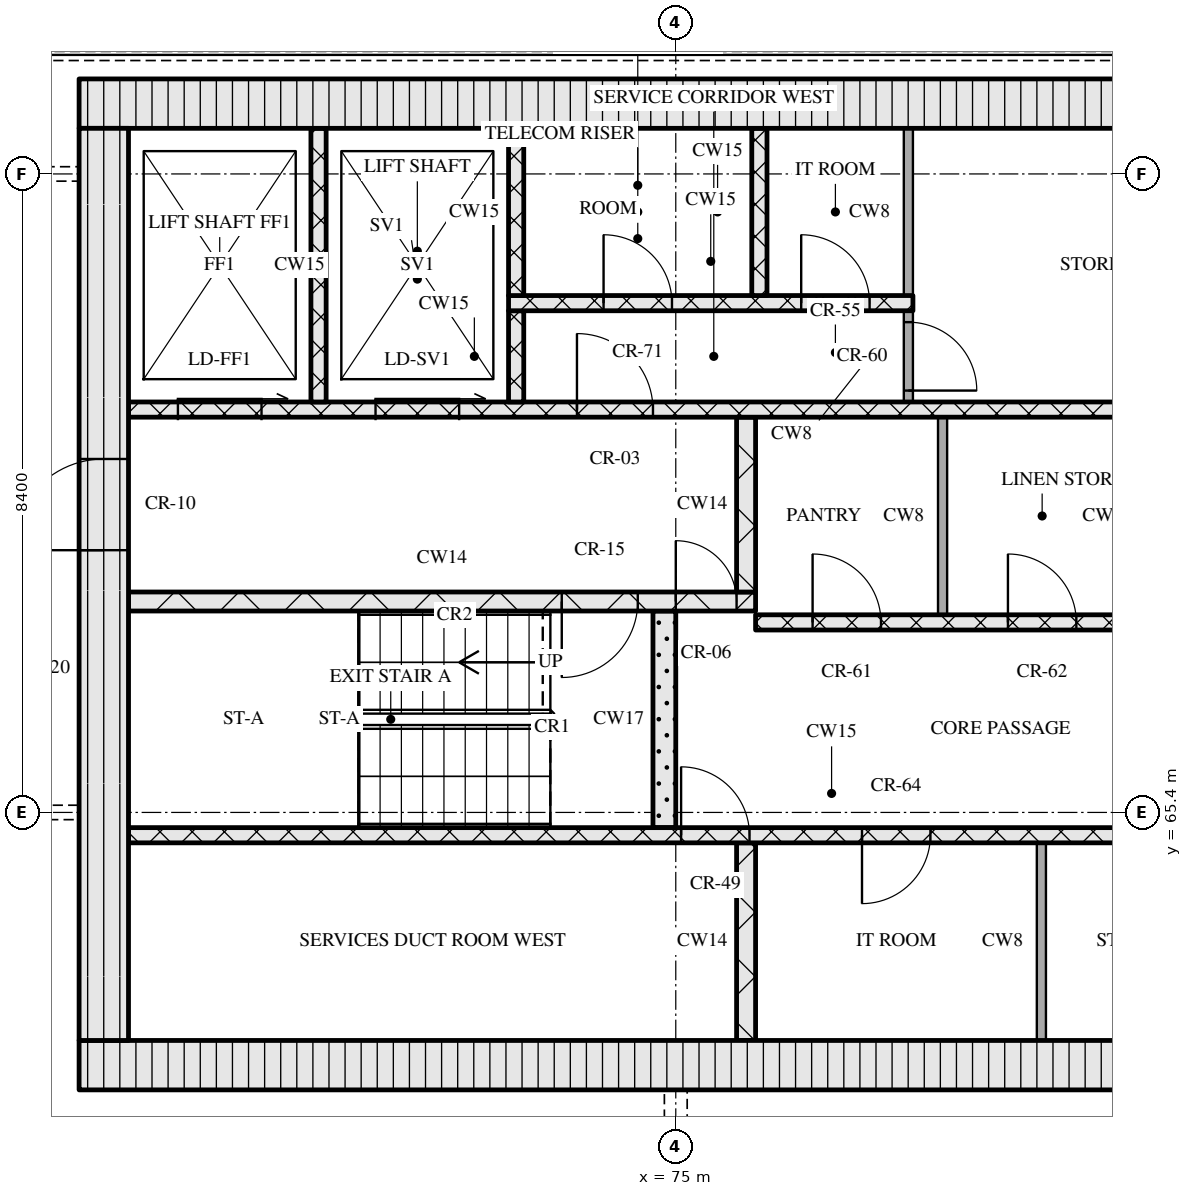
"""IFC4 building model, lengths in metres.
Left out: names, types, materials, properties, quantities, classifications, styles, units other than length and angle.
Written with IfcOpenShell. Run it as: python <this file> out.ifc"""

import sys

from ifc_helpers import new_model, si_unit, direction, frame, frame_2d, origin, place, context, subcontext, project, spatial, rectangle, extrude, element, fill, save


model = new_model("IFC4")
c1 = context("Model", 3, precision=1e-05, world=origin(), true_north=direction((0.0, 1.0)))
c2 = subcontext(c1, "Body", "Model", "MODEL_VIEW")
j1 = project(units=[si_unit("LENGTHUNIT", "METRE"), si_unit("PLANEANGLEUNIT", "RADIAN")], contexts=[c1])
p1 = place(None, origin())
s1 = spatial("IfcSite", under=j1, at=p1, CompositionType="ELEMENT")
p2 = place(p1, origin())
s2 = spatial("IfcBuilding", under=s1, at=p2, CompositionType="ELEMENT")
p3 = place(p2, frame((0.0, 0.0, 237.9)))
s3 = spatial("IfcBuildingStorey", under=s2, at=p3, CompositionType="ELEMENT", Elevation=237.9)
p4 = place(p3, frame((67.15, 62.075, 0.0), z_axis=(0.0, 0.0, 1.0), x_axis=(1.0, 0.0, 0.0)))
e1 = element("IfcWall", 1, at=p4, inside=s3, PredefinedType="SOLIDWALL", context=c2, shape_type="SweptSolid", body=[
    extrude(rectangle(XDim=40.9, YDim=0.65, at=frame_2d((20.45, 0.0))), origin(), (0.0, 0.0, 1.0), 3.32),
])
p5 = place(p4, frame((20.8, 0.0, 0.0)))
e2 = element("IfcOpeningElement", 2, at=p5, cuts=e1, PredefinedType="OPENING", context=c2, shape_type="SweptSolid", body=[
    extrude(rectangle(XDim=1.8, YDim=2.1, at=frame_2d((0.9, 1.05))), frame((0.0, 0.335, 0.0), z_axis=(0.0, -1.0, 0.0), x_axis=(1.0, 0.0, 0.0)), (0.0, 0.0, 1.0), 0.67),
])
p6 = place(p3, frame((67.15, 74.725, 0.0), z_axis=(0.0, 0.0, 1.0), x_axis=(1.0, 0.0, 0.0)))
e3 = element("IfcWall", 3, at=p6, inside=s3, PredefinedType="SOLIDWALL", context=c2, shape_type="SweptSolid", body=[
    extrude(rectangle(XDim=40.9, YDim=0.65, at=frame_2d((20.45, 0.0))), origin(), (0.0, 0.0, 1.0), 3.32),
])
p7 = place(p3, frame((67.475, 62.4, 0.0), z_axis=(0.0, 0.0, 1.0), x_axis=(0.0, 1.0, 0.0)))
e4 = element("IfcWall", 4, at=p7, inside=s3, PredefinedType="SOLIDWALL", context=c2, shape_type="SweptSolid", body=[
    extrude(rectangle(XDim=12.0, YDim=0.65, at=frame_2d((6.0, 0.0))), origin(), (0.0, 0.0, 1.0), 3.32),
])
p8 = place(p7, frame((6.45, 0.0, 0.0)))
e5 = element("IfcOpeningElement", 5, at=p8, cuts=e4, PredefinedType="OPENING", context=c2, shape_type="SweptSolid", body=[
    extrude(rectangle(XDim=1.2, YDim=2.1, at=frame_2d((0.6, 1.05))), frame((0.0, 0.335, 0.0), z_axis=(0.0, -1.0, 0.0), x_axis=(1.0, 0.0, 0.0)), (0.0, 0.0, 1.0), 0.67),
])
p9 = place(p3, frame((75.925, 62.4, 0.0), z_axis=(0.0, 0.0, 1.0), x_axis=(0.0, 1.0, 0.0)))
e6 = element("IfcWall", 6, at=p9, inside=s3, PredefinedType="SOLIDWALL", context=c2, shape_type="SweptSolid", body=[
    extrude(rectangle(XDim=2.6, YDim=0.25, at=frame_2d((1.3, 0.0))), origin(), (0.0, 0.0, 1.0), 3.32),
])
p10 = place(p3, frame((79.81, 62.4, 0.0), z_axis=(0.0, 0.0, 1.0), x_axis=(0.0, 1.0, 0.0)))
e7 = element("IfcWall", 7, at=p10, inside=s3, PredefinedType="PARTITIONING", context=c2, shape_type="SweptSolid", body=[
    extrude(rectangle(XDim=2.6, YDim=0.12, at=frame_2d((1.3, 0.0))), origin(), (0.0, 0.0, 1.0), 3.32),
])
p11 = place(p3, frame((67.8, 65.1, 0.0), z_axis=(0.0, 0.0, 1.0), x_axis=(1.0, 0.0, 0.0)))
e8 = element("IfcWall", 8, at=p11, inside=s3, PredefinedType="SOLIDWALL", context=c2, shape_type="SweptSolid", body=[
    extrude(rectangle(XDim=18.5, YDim=0.2, at=frame_2d((9.25, 0.0))), origin(), (0.0, 0.0, 1.0), 3.32),
])
p12 = place(p11, frame((7.27, 0.0, 0.0)))
e9 = element("IfcOpeningElement", 9, at=p12, cuts=e8, PredefinedType="OPENING", context=c2, shape_type="SweptSolid", body=[
    extrude(rectangle(XDim=0.9, YDim=2.1, at=frame_2d((0.45, 1.05))), frame((0.0, 0.11, 0.0), z_axis=(0.0, -1.0, 0.0), x_axis=(1.0, 0.0, 0.0)), (0.0, 0.0, 1.0), 0.22),
])
p13 = place(p11, frame((9.65, 0.0, 0.0)))
e10 = element("IfcOpeningElement", 10, at=p13, cuts=e8, PredefinedType="OPENING", context=c2, shape_type="SweptSolid", body=[
    extrude(rectangle(XDim=0.9, YDim=2.1, at=frame_2d((0.45, 1.05))), frame((0.0, 0.11, 0.0), z_axis=(0.0, -1.0, 0.0), x_axis=(1.0, 0.0, 0.0)), (0.0, 0.0, 1.0), 0.22),
])
p14 = place(p11, frame((13.36, 0.0, 0.0)))
e11 = element("IfcOpeningElement", 11, at=p14, cuts=e8, PredefinedType="OPENING", context=c2, shape_type="SweptSolid", body=[
    extrude(rectangle(XDim=0.9, YDim=2.1, at=frame_2d((0.45, 1.05))), frame((0.0, 0.11, 0.0), z_axis=(0.0, -1.0, 0.0), x_axis=(1.0, 0.0, 0.0)), (0.0, 0.0, 1.0), 0.22),
])
p15 = place(p11, frame((16.7, 0.0, 0.0)))
e12 = element("IfcOpeningElement", 12, at=p15, cuts=e8, PredefinedType="OPENING", context=c2, shape_type="SweptSolid", body=[
    extrude(rectangle(XDim=0.9, YDim=2.1, at=frame_2d((0.45, 1.05))), frame((0.0, 0.11, 0.0), z_axis=(0.0, -1.0, 0.0), x_axis=(1.0, 0.0, 0.0)), (0.0, 0.0, 1.0), 0.22),
])
p16 = place(p3, frame((74.85, 65.2, 0.0), z_axis=(0.0, 0.0, 1.0), x_axis=(0.0, 1.0, 0.0)))
e13 = element("IfcWall", 13, at=p16, inside=s3, PredefinedType="SOLIDWALL", context=c2, shape_type="SweptSolid", body=[
    extrude(rectangle(XDim=2.85, YDim=0.3, at=frame_2d((1.425, 0.0))), origin(), (0.0, 0.0, 1.0), 3.32),
])
p17 = place(p3, frame((76.05, 67.9, 0.0), z_axis=(0.0, 0.0, 1.0), x_axis=(1.0, 0.0, 0.0)))
e14 = element("IfcWall", 14, at=p17, inside=s3, PredefinedType="SOLIDWALL", context=c2, shape_type="SweptSolid", body=[
    extrude(rectangle(XDim=23.1, YDim=0.2, at=frame_2d((11.55, 0.0))), origin(), (0.0, 0.0, 1.0), 3.32),
])
p18 = place(p17, frame((0.75, 0.0, 0.0)))
e15 = element("IfcOpeningElement", 15, at=p18, cuts=e14, PredefinedType="OPENING", context=c2, shape_type="SweptSolid", body=[
    extrude(rectangle(XDim=0.9, YDim=2.1, at=frame_2d((0.45, 1.05))), frame((0.0, 0.11, 0.0), z_axis=(0.0, -1.0, 0.0), x_axis=(1.0, 0.0, 0.0)), (0.0, 0.0, 1.0), 0.22),
])
p19 = place(p17, frame((3.32, 0.0, 0.0)))
e16 = element("IfcOpeningElement", 16, at=p19, cuts=e14, PredefinedType="OPENING", context=c2, shape_type="SweptSolid", body=[
    extrude(rectangle(XDim=0.9, YDim=2.1, at=frame_2d((0.45, 1.05))), frame((0.0, 0.11, 0.0), z_axis=(0.0, -1.0, 0.0), x_axis=(1.0, 0.0, 0.0)), (0.0, 0.0, 1.0), 0.22),
])
p20 = place(p17, frame((5.77, 0.0, 0.0)))
e17 = element("IfcOpeningElement", 17, at=p20, cuts=e14, PredefinedType="OPENING", context=c2, shape_type="SweptSolid", body=[
    extrude(rectangle(XDim=0.9, YDim=2.1, at=frame_2d((0.45, 1.05))), frame((0.0, 0.11, 0.0), z_axis=(0.0, -1.0, 0.0), x_axis=(1.0, 0.0, 0.0)), (0.0, 0.0, 1.0), 0.22),
])
p21 = place(p17, frame((8.45, 0.0, 0.0)))
e18 = element("IfcOpeningElement", 18, at=p21, cuts=e14, PredefinedType="OPENING", context=c2, shape_type="SweptSolid", body=[
    extrude(rectangle(XDim=0.9, YDim=2.1, at=frame_2d((0.45, 1.05))), frame((0.0, 0.11, 0.0), z_axis=(0.0, -1.0, 0.0), x_axis=(1.0, 0.0, 0.0)), (0.0, 0.0, 1.0), 0.22),
])
p22 = place(p17, frame((10.91, 0.0, 0.0)))
e19 = element("IfcOpeningElement", 19, at=p22, cuts=e14, PredefinedType="OPENING", context=c2, shape_type="SweptSolid", body=[
    extrude(rectangle(XDim=0.9, YDim=2.1, at=frame_2d((0.45, 1.05))), frame((0.0, 0.11, 0.0), z_axis=(0.0, -1.0, 0.0), x_axis=(1.0, 0.0, 0.0)), (0.0, 0.0, 1.0), 0.22),
])
p23 = place(p17, frame((13.55, 0.0, 0.0)))
e20 = element("IfcOpeningElement", 20, at=p23, cuts=e14, PredefinedType="OPENING", context=c2, shape_type="SweptSolid", body=[
    extrude(rectangle(XDim=1.0, YDim=2.1, at=frame_2d((0.5, 1.05))), frame((0.0, 0.11, 0.0), z_axis=(0.0, -1.0, 0.0), x_axis=(1.0, 0.0, 0.0)), (0.0, 0.0, 1.0), 0.22),
])
p24 = place(p17, frame((16.2, 0.0, 0.0)))
e21 = element("IfcOpeningElement", 21, at=p24, cuts=e14, PredefinedType="OPENING", context=c2, shape_type="SweptSolid", body=[
    extrude(rectangle(XDim=1.1, YDim=2.1, at=frame_2d((0.55, 1.05))), frame((0.0, 0.11, 0.0), z_axis=(0.0, -1.0, 0.0), x_axis=(1.0, 0.0, 0.0)), (0.0, 0.0, 1.0), 0.22),
])
p25 = place(p17, frame((18.7, 0.0, 0.0)))
e22 = element("IfcOpeningElement", 22, at=p25, cuts=e14, PredefinedType="OPENING", context=c2, shape_type="SweptSolid", body=[
    extrude(rectangle(XDim=1.1, YDim=2.1, at=frame_2d((0.55, 1.05))), frame((0.0, 0.11, 0.0), z_axis=(0.0, -1.0, 0.0), x_axis=(1.0, 0.0, 0.0)), (0.0, 0.0, 1.0), 0.22),
])
p26 = place(p17, frame((21.2, 0.0, 0.0)))
e23 = element("IfcOpeningElement", 23, at=p26, cuts=e14, PredefinedType="OPENING", context=c2, shape_type="SweptSolid", body=[
    extrude(rectangle(XDim=1.1, YDim=2.1, at=frame_2d((0.55, 1.05))), frame((0.0, 0.11, 0.0), z_axis=(0.0, -1.0, 0.0), x_axis=(1.0, 0.0, 0.0)), (0.0, 0.0, 1.0), 0.22),
])
p27 = place(p3, frame((78.51, 68.0, 0.0), z_axis=(0.0, 0.0, 1.0), x_axis=(0.0, 1.0, 0.0)))
e24 = element("IfcWall", 24, at=p27, inside=s3, PredefinedType="PARTITIONING", context=c2, shape_type="SweptSolid", body=[
    extrude(rectangle(XDim=2.6, YDim=0.12, at=frame_2d((1.3, 0.0))), origin(), (0.0, 0.0, 1.0), 3.32),
])
p28 = place(p3, frame((67.8, 68.175, 0.0), z_axis=(0.0, 0.0, 1.0), x_axis=(1.0, 0.0, 0.0)))
e25 = element("IfcWall", 25, at=p28, inside=s3, PredefinedType="SOLIDWALL", context=c2, shape_type="SweptSolid", body=[
    extrude(rectangle(XDim=8.25, YDim=0.25, at=frame_2d((4.125, 0.0))), origin(), (0.0, 0.0, 1.0), 3.32),
])
p29 = place(p28, frame((5.7, 0.0, 0.0)))
e26 = element("IfcOpeningElement", 26, at=p29, cuts=e25, PredefinedType="OPENING", context=c2, shape_type="SweptSolid", body=[
    extrude(rectangle(XDim=1.0, YDim=2.1, at=frame_2d((0.5, 1.05))), frame((0.0, 0.135, 0.0), z_axis=(0.0, -1.0, 0.0), x_axis=(1.0, 0.0, 0.0)), (0.0, 0.0, 1.0), 0.27),
])
p30 = place(p28, frame((7.2, 0.0, 0.0)))
e27 = element("IfcOpeningElement", 27, at=p30, cuts=e25, PredefinedType="OPENING", context=c2, shape_type="SweptSolid", body=[
    extrude(rectangle(XDim=0.8, YDim=2.1, at=frame_2d((0.4, 1.05))), frame((0.0, 0.135, 0.0), z_axis=(0.0, -1.0, 0.0), x_axis=(1.0, 0.0, 0.0)), (0.0, 0.0, 1.0), 0.27),
])
p31 = place(p3, frame((75.925, 68.3, 0.0), z_axis=(0.0, 0.0, 1.0), x_axis=(0.0, 1.0, 0.0)))
e28 = element("IfcWall", 28, at=p31, inside=s3, PredefinedType="SOLIDWALL", context=c2, shape_type="SweptSolid", body=[
    extrude(rectangle(XDim=2.3, YDim=0.25, at=frame_2d((1.15, 0.0))), origin(), (0.0, 0.0, 1.0), 3.32),
])
p32 = place(p3, frame((67.8, 70.7, 0.0), z_axis=(0.0, 0.0, 1.0), x_axis=(1.0, 0.0, 0.0)))
e29 = element("IfcWall", 29, at=p32, inside=s3, PredefinedType="SOLIDWALL", context=c2, shape_type="SweptSolid", body=[
    extrude(rectangle(XDim=39.6, YDim=0.2, at=frame_2d((19.8, 0.0))), origin(), (0.0, 0.0, 1.0), 3.32),
])
p33 = place(p32, frame((0.65, 0.0, 0.0)))
e30 = element("IfcOpeningElement", 30, at=p33, cuts=e29, PredefinedType="OPENING", context=c2, shape_type="SweptSolid", body=[
    extrude(rectangle(XDim=1.1, YDim=2.1, at=frame_2d((0.55, 1.05))), frame((0.0, 0.11, 0.0), z_axis=(0.0, -1.0, 0.0), x_axis=(1.0, 0.0, 0.0)), (0.0, 0.0, 1.0), 0.22),
])
p34 = place(p32, frame((3.25, 0.0, 0.0)))
e31 = element("IfcOpeningElement", 31, at=p34, cuts=e29, PredefinedType="OPENING", context=c2, shape_type="SweptSolid", body=[
    extrude(rectangle(XDim=1.1, YDim=2.1, at=frame_2d((0.55, 1.05))), frame((0.0, 0.11, 0.0), z_axis=(0.0, -1.0, 0.0), x_axis=(1.0, 0.0, 0.0)), (0.0, 0.0, 1.0), 0.22),
])
p35 = place(p32, frame((5.9, 0.0, 0.0)))
e32 = element("IfcOpeningElement", 32, at=p35, cuts=e29, PredefinedType="OPENING", context=c2, shape_type="SweptSolid", body=[
    extrude(rectangle(XDim=1.0, YDim=2.1, at=frame_2d((0.5, 1.05))), frame((0.0, 0.11, 0.0), z_axis=(0.0, -1.0, 0.0), x_axis=(1.0, 0.0, 0.0)), (0.0, 0.0, 1.0), 0.22),
])
p36 = place(p32, frame((21.7, 0.0, 0.0)))
e33 = element("IfcOpeningElement", 33, at=p36, cuts=e29, PredefinedType="OPENING", context=c2, shape_type="SweptSolid", body=[
    extrude(rectangle(XDim=1.0, YDim=2.1, at=frame_2d((0.5, 1.05))), frame((0.0, 0.11, 0.0), z_axis=(0.0, -1.0, 0.0), x_axis=(1.0, 0.0, 0.0)), (0.0, 0.0, 1.0), 0.22),
])
p37 = place(p32, frame((32.7, 0.0, 0.0)))
e34 = element("IfcOpeningElement", 34, at=p37, cuts=e29, PredefinedType="OPENING", context=c2, shape_type="SweptSolid", body=[
    extrude(rectangle(XDim=1.0, YDim=2.1, at=frame_2d((0.5, 1.05))), frame((0.0, 0.11, 0.0), z_axis=(0.0, -1.0, 0.0), x_axis=(1.0, 0.0, 0.0)), (0.0, 0.0, 1.0), 0.22),
])
p38 = place(p32, frame((35.25, 0.0, 0.0)))
e35 = element("IfcOpeningElement", 35, at=p38, cuts=e29, PredefinedType="OPENING", context=c2, shape_type="SweptSolid", body=[
    extrude(rectangle(XDim=1.1, YDim=2.1, at=frame_2d((0.55, 1.05))), frame((0.0, 0.11, 0.0), z_axis=(0.0, -1.0, 0.0), x_axis=(1.0, 0.0, 0.0)), (0.0, 0.0, 1.0), 0.22),
])
p39 = place(p32, frame((37.85, 0.0, 0.0)))
e36 = element("IfcOpeningElement", 36, at=p39, cuts=e29, PredefinedType="OPENING", context=c2, shape_type="SweptSolid", body=[
    extrude(rectangle(XDim=1.1, YDim=2.1, at=frame_2d((0.55, 1.05))), frame((0.0, 0.11, 0.0), z_axis=(0.0, -1.0, 0.0), x_axis=(1.0, 0.0, 0.0)), (0.0, 0.0, 1.0), 0.22),
])
p40 = place(p3, frame((70.3, 70.8, 0.0), z_axis=(0.0, 0.0, 1.0), x_axis=(0.0, 1.0, 0.0)))
e37 = element("IfcWall", 37, at=p40, inside=s3, PredefinedType="SOLIDWALL", context=c2, shape_type="SweptSolid", body=[
    extrude(rectangle(XDim=3.6, YDim=0.2, at=frame_2d((1.8, 0.0))), origin(), (0.0, 0.0, 1.0), 3.32),
])
p41 = place(p3, frame((72.9, 70.8, 0.0), z_axis=(0.0, 0.0, 1.0), x_axis=(0.0, 1.0, 0.0)))
e38 = element("IfcWall", 38, at=p41, inside=s3, PredefinedType="SOLIDWALL", context=c2, shape_type="SweptSolid", body=[
    extrude(rectangle(XDim=1.2, YDim=0.2, at=frame_2d((0.6, 0.0))), origin(), (0.0, 0.0, 1.0), 3.32),
])
p42 = place(p3, frame((78.06, 70.8, 0.0), z_axis=(0.0, 0.0, 1.0), x_axis=(0.0, 1.0, 0.0)))
e39 = element("IfcWall", 39, at=p42, inside=s3, PredefinedType="PARTITIONING", context=c2, shape_type="SweptSolid", body=[
    extrude(rectangle(XDim=1.2, YDim=0.12, at=frame_2d((0.6, 0.0))), origin(), (0.0, 0.0, 1.0), 3.32),
])
p43 = place(p42, frame((0.15, 0.0, 0.0)))
e40 = element("IfcOpeningElement", 40, at=p43, cuts=e39, PredefinedType="OPENING", context=c2, shape_type="SweptSolid", body=[
    extrude(rectangle(XDim=0.9, YDim=2.1, at=frame_2d((0.45, 1.05))), frame((0.0, 0.07, 0.0), z_axis=(0.0, -1.0, 0.0), x_axis=(1.0, 0.0, 0.0)), (0.0, 0.0, 1.0), 0.14),
])
p44 = place(p3, frame((72.8, 72.1, 0.0), z_axis=(0.0, 0.0, 1.0), x_axis=(1.0, 0.0, 0.0)))
e41 = element("IfcWall", 41, at=p44, inside=s3, PredefinedType="SOLIDWALL", context=c2, shape_type="SweptSolid", body=[
    extrude(rectangle(XDim=5.32, YDim=0.2, at=frame_2d((2.66, 0.0))), origin(), (0.0, 0.0, 1.0), 3.32),
])
p45 = place(p44, frame((1.25, 0.0, 0.0)))
e42 = element("IfcOpeningElement", 42, at=p45, cuts=e41, PredefinedType="OPENING", context=c2, shape_type="SweptSolid", body=[
    extrude(rectangle(XDim=0.9, YDim=2.1, at=frame_2d((0.45, 1.05))), frame((0.0, 0.11, 0.0), z_axis=(0.0, -1.0, 0.0), x_axis=(1.0, 0.0, 0.0)), (0.0, 0.0, 1.0), 0.22),
])
p46 = place(p44, frame((3.85, 0.0, 0.0)))
e43 = element("IfcOpeningElement", 43, at=p46, cuts=e41, PredefinedType="OPENING", context=c2, shape_type="SweptSolid", body=[
    extrude(rectangle(XDim=0.9, YDim=2.1, at=frame_2d((0.45, 1.05))), frame((0.0, 0.11, 0.0), z_axis=(0.0, -1.0, 0.0), x_axis=(1.0, 0.0, 0.0)), (0.0, 0.0, 1.0), 0.22),
])
for number, where, z_axis, x_axis in (
    (44, (72.9, 72.2, 0.0), (0.0, 0.0, 1.0), (0.0, 1.0, 0.0)),
    (45, (76.1, 72.2, 0.0), (0.0, 0.0, 1.0), (0.0, 1.0, 0.0)),
):
    element("IfcWall", number, at=place(p3, frame(where, z_axis=z_axis, x_axis=x_axis)), inside=s3, PredefinedType="SOLIDWALL", context=c2, shape_type="SweptSolid", body=[
        extrude(rectangle(XDim=2.2, YDim=0.2, at=frame_2d((1.1, 0.0))), origin(), (0.0, 0.0, 1.0), 3.32),
    ])
p47 = place(p3, frame((78.06, 72.2, 0.0), z_axis=(0.0, 0.0, 1.0), x_axis=(0.0, 1.0, 0.0)))
e46 = element("IfcWall", 46, at=p47, inside=s3, PredefinedType="PARTITIONING", context=c2, shape_type="SweptSolid", body=[
    extrude(rectangle(XDim=2.2, YDim=0.12, at=frame_2d((1.1, 0.0))), origin(), (0.0, 0.0, 1.0), 3.32),
])
p48 = place(p12, origin())
e47 = element("IfcDoor", 47, at=p48, inside=s3, OperationType="SINGLE_SWING_LEFT", PredefinedType="DOOR", context=c2, shape_type="SweptSolid", body=[
    extrude(rectangle(XDim=0.9, YDim=2.1, at=frame_2d((0.45, 1.05))), frame((0.0, 0.025, 0.0), z_axis=(0.0, -1.0, 0.0), x_axis=(1.0, 0.0, 0.0)), (0.0, 0.0, 1.0), 0.05),
])
fill(e9, e47)
p49 = place(p13, origin())
e48 = element("IfcDoor", 48, at=p49, inside=s3, OperationType="SINGLE_SWING_RIGHT", PredefinedType="DOOR", context=c2, shape_type="SweptSolid", body=[
    extrude(rectangle(XDim=0.9, YDim=2.1, at=frame_2d((0.45, 1.05))), frame((0.0, 0.025, 0.0), z_axis=(0.0, -1.0, 0.0), x_axis=(1.0, 0.0, 0.0)), (0.0, 0.0, 1.0), 0.05),
])
fill(e10, e48)
p50 = place(p18, origin())
e49 = element("IfcDoor", 49, at=p50, inside=s3, OperationType="SINGLE_SWING_LEFT", PredefinedType="DOOR", context=c2, shape_type="SweptSolid", body=[
    extrude(rectangle(XDim=0.9, YDim=2.1, at=frame_2d((0.45, 1.05))), frame((0.0, 0.025, 0.0), z_axis=(0.0, -1.0, 0.0), x_axis=(1.0, 0.0, 0.0)), (0.0, 0.0, 1.0), 0.05),
])
fill(e15, e49)
p51 = place(p19, origin())
e50 = element("IfcDoor", 50, at=p51, inside=s3, OperationType="SINGLE_SWING_LEFT", PredefinedType="DOOR", context=c2, shape_type="SweptSolid", body=[
    extrude(rectangle(XDim=0.9, YDim=2.1, at=frame_2d((0.45, 1.05))), frame((0.0, 0.025, 0.0), z_axis=(0.0, -1.0, 0.0), x_axis=(1.0, 0.0, 0.0)), (0.0, 0.0, 1.0), 0.05),
])
fill(e16, e50)
p52 = place(p29, origin())
e51 = element("IfcDoor", 51, at=p52, inside=s3, OperationType="SINGLE_SWING_RIGHT", PredefinedType="DOOR", context=c2, shape_type="SweptSolid", body=[
    extrude(rectangle(XDim=1.0, YDim=2.1, at=frame_2d((0.5, 1.05))), frame((0.0, 0.025, 0.0), z_axis=(0.0, -1.0, 0.0), x_axis=(1.0, 0.0, 0.0)), (0.0, 0.0, 1.0), 0.05),
])
fill(e26, e51)
p53 = place(p30, origin())
e52 = element("IfcDoor", 52, at=p53, inside=s3, OperationType="SINGLE_SWING_LEFT", PredefinedType="DOOR", context=c2, shape_type="SweptSolid", body=[
    extrude(rectangle(XDim=0.8, YDim=2.1, at=frame_2d((0.4, 1.05))), frame((0.0, 0.025, 0.0), z_axis=(0.0, -1.0, 0.0), x_axis=(1.0, 0.0, 0.0)), (0.0, 0.0, 1.0), 0.05),
])
fill(e27, e52)
p54 = place(p8, origin())
e53 = element("IfcDoor", 53, at=p54, inside=s3, OperationType="SINGLE_SWING_LEFT", PredefinedType="DOOR", context=c2, shape_type="SweptSolid", body=[
    extrude(rectangle(XDim=1.2, YDim=2.1, at=frame_2d((0.6, 1.05))), frame((0.0, 0.025, 0.0), z_axis=(0.0, -1.0, 0.0), x_axis=(1.0, 0.0, 0.0)), (0.0, 0.0, 1.0), 0.05),
])
fill(e5, e53)
p55 = place(p33, origin())
e54 = element("IfcDoor", 54, at=p55, inside=s3, OperationType="SLIDING_TO_RIGHT", PredefinedType="DOOR", context=c2, shape_type="SweptSolid", body=[
    extrude(rectangle(XDim=1.1, YDim=2.1, at=frame_2d((0.55, 1.05))), frame((0.0, 0.025, 0.0), z_axis=(0.0, -1.0, 0.0), x_axis=(1.0, 0.0, 0.0)), (0.0, 0.0, 1.0), 0.05),
])
fill(e30, e54)
p56 = place(p34, origin())
e55 = element("IfcDoor", 55, at=p56, inside=s3, OperationType="SLIDING_TO_RIGHT", PredefinedType="DOOR", context=c2, shape_type="SweptSolid", body=[
    extrude(rectangle(XDim=1.1, YDim=2.1, at=frame_2d((0.55, 1.05))), frame((0.0, 0.025, 0.0), z_axis=(0.0, -1.0, 0.0), x_axis=(1.0, 0.0, 0.0)), (0.0, 0.0, 1.0), 0.05),
])
fill(e31, e55)
p57 = place(p35, origin())
e56 = element("IfcDoor", 56, at=p57, inside=s3, OperationType="SINGLE_SWING_LEFT", PredefinedType="DOOR", context=c2, shape_type="SweptSolid", body=[
    extrude(rectangle(XDim=1.0, YDim=2.1, at=frame_2d((0.5, 1.05))), frame((0.0, 0.025, 0.0), z_axis=(0.0, -1.0, 0.0), x_axis=(1.0, 0.0, 0.0)), (0.0, 0.0, 1.0), 0.05),
])
fill(e32, e56)
p58 = place(p43, origin())
e57 = element("IfcDoor", 57, at=p58, inside=s3, OperationType="SINGLE_SWING_RIGHT", PredefinedType="DOOR", context=c2, shape_type="SweptSolid", body=[
    extrude(rectangle(XDim=0.9, YDim=2.1, at=frame_2d((0.45, 1.05))), frame((0.0, 0.025, 0.0), z_axis=(0.0, -1.0, 0.0), x_axis=(1.0, 0.0, 0.0)), (0.0, 0.0, 1.0), 0.05),
])
fill(e40, e57)
p59 = place(p45, origin())
e58 = element("IfcDoor", 58, at=p59, inside=s3, OperationType="SINGLE_SWING_LEFT", PredefinedType="DOOR", context=c2, shape_type="SweptSolid", body=[
    extrude(rectangle(XDim=0.9, YDim=2.1, at=frame_2d((0.45, 1.05))), frame((0.0, 0.025, 0.0), z_axis=(0.0, -1.0, 0.0), x_axis=(1.0, 0.0, 0.0)), (0.0, 0.0, 1.0), 0.05),
])
fill(e42, e58)
p60 = place(p46, origin())
e59 = element("IfcDoor", 59, at=p60, inside=s3, OperationType="SINGLE_SWING_LEFT", PredefinedType="DOOR", context=c2, shape_type="SweptSolid", body=[
    extrude(rectangle(XDim=0.9, YDim=2.1, at=frame_2d((0.45, 1.05))), frame((0.0, 0.025, 0.0), z_axis=(0.0, -1.0, 0.0), x_axis=(1.0, 0.0, 0.0)), (0.0, 0.0, 1.0), 0.05),
])
fill(e43, e59)
save(model, sys.argv[1])
